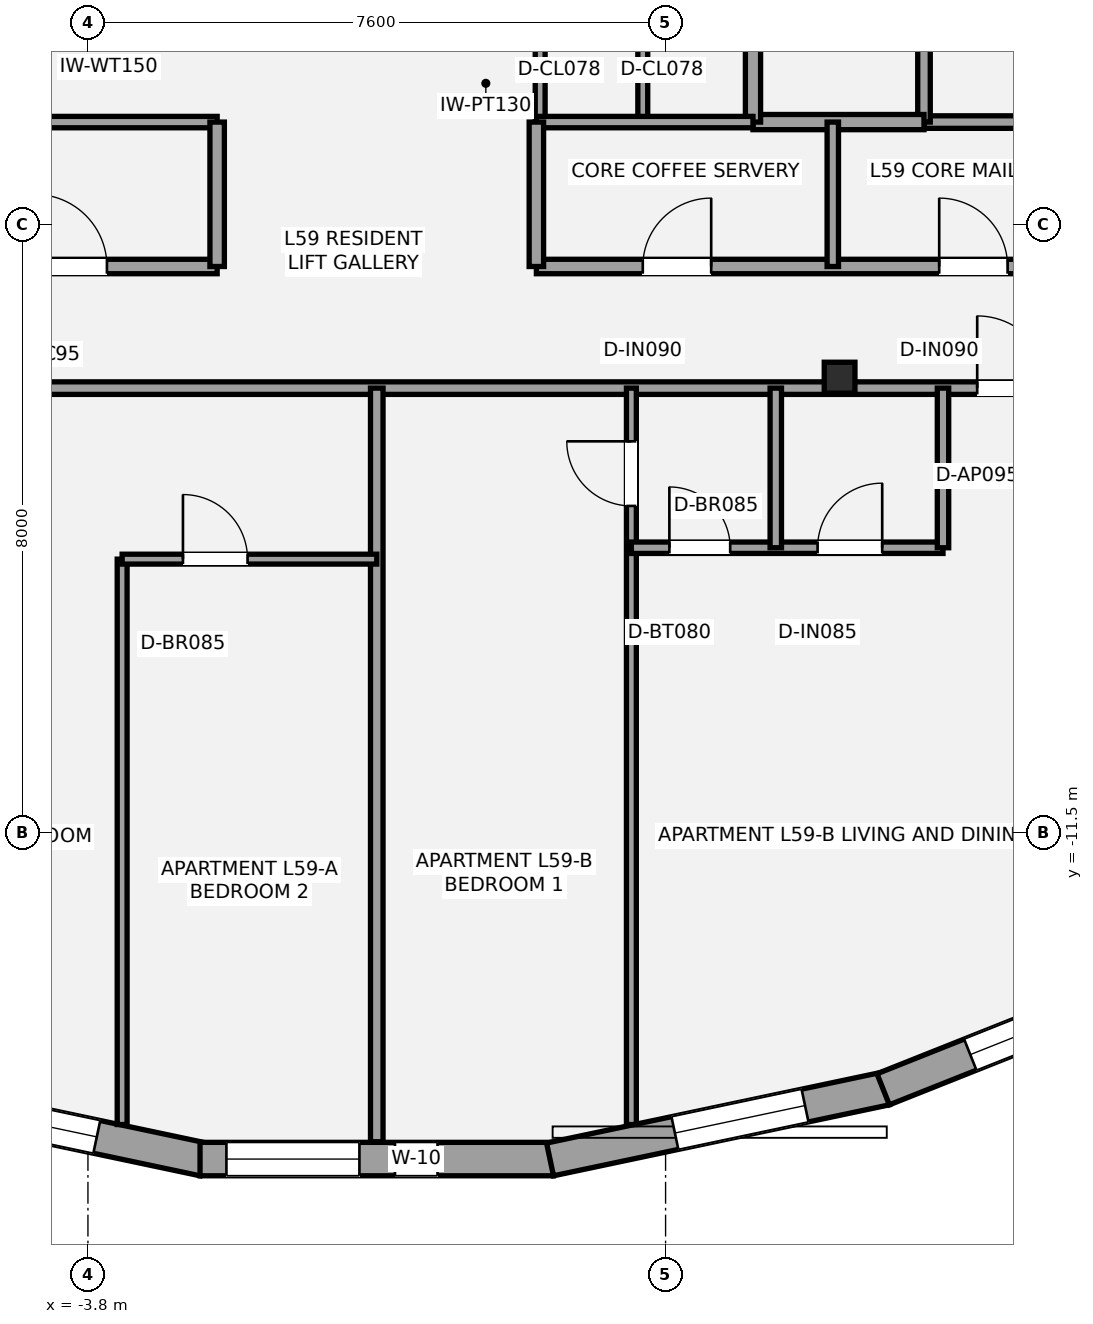
"""IFC4 building model, lengths in metres.
Left out: names, types, materials, properties, quantities, classifications, styles, units other than length and angle.
Written with IfcOpenShell. Run it as: python <this file> out.ifc"""

import sys

from ifc_helpers import new_model, si_unit, direction, frame, frame_2d, origin, origin_2d, place, context, subcontext, project, spatial, rectangle, i_section, extrude, element, fill, save


model = new_model("IFC4")
c1 = context("Model", 3, precision=1e-05, world=origin(), true_north=direction((0.0, 1.0)))
c2 = subcontext(c1, "Body", "Model", "MODEL_VIEW")
j1 = project(units=[si_unit("LENGTHUNIT", "METRE"), si_unit("PLANEANGLEUNIT", "RADIAN")], contexts=[c1])
p1 = place(None, origin())
s1 = spatial("IfcSite", under=j1, at=p1, CompositionType="ELEMENT")
p2 = place(p1, origin())
s2 = spatial("IfcBuilding", under=s1, at=p2, CompositionType="ELEMENT")
p3 = place(p2, frame((0.0, 0.0, 213.15)))
s3 = spatial("IfcBuildingStorey", under=s2, at=p3, CompositionType="ELEMENT", Elevation=213.15)
p4 = place(p3, frame((6.09, -5.513, 0.0), z_axis=(0.0, 0.0, 1.0), x_axis=(1.0, 0.0, 0.0)))
e1 = element("IfcColumn", 1, at=p4, inside=s3, PredefinedType="COLUMN", context=c2, shape_type="SweptSolid", body=[
    extrude(i_section(OverallWidth=0.404, OverallDepth=0.407, WebThickness=0.027, FlangeThickness=0.044, at=origin_2d()), origin(), (0.0, 0.0, 1.0), 3.15),
])
p5 = place(p3, frame((-2.28, -15.798, 0.0), z_axis=(0.0, 0.0, 1.0), x_axis=(-0.97840271225, 0.206707843737, 0.0)))
e2 = element("IfcWall", 2, at=p5, inside=s3, PredefinedType="STANDARD", context=c2, shape_type="SweptSolid", body=[
    extrude(rectangle(XDim=4.517, YDim=0.44, at=frame_2d((2.258, 0.0))), origin(), (0.0, 0.0, 1.0), 2.336),
])
p6 = place(p5, frame((1.435, 0.0, 0.58)))
e3 = element("IfcOpeningElement", 3, at=p6, cuts=e2, PredefinedType="OPENING", context=c2, shape_type="SweptSolid", body=[
    extrude(rectangle(XDim=1.4, YDim=1.55, at=frame_2d((0.7, 0.775))), frame((0.0, 0.23, 0.0), z_axis=(0.0, -1.0, 0.0), x_axis=(1.0, 0.0, 0.0)), (0.0, 0.0, 1.0), 0.46),
])
p7 = place(p3, frame((2.325, -15.793, 0.0), z_axis=(0.0, 0.0, 1.0), x_axis=(-1.0, 0.0, 0.0)))
e4 = element("IfcWall", 4, at=p7, inside=s3, PredefinedType="STANDARD", context=c2, shape_type="SweptSolid", body=[
    extrude(rectangle(XDim=4.65, YDim=0.44, at=frame_2d((2.325, 0.0))), origin(), (0.0, 0.0, 1.0), 2.336),
])
p8 = place(p7, frame((2.553, 0.0, 0.55)))
e5 = element("IfcOpeningElement", 5, at=p8, cuts=e4, PredefinedType="OPENING", context=c2, shape_type="SweptSolid", body=[
    extrude(rectangle(XDim=1.75, YDim=1.55, at=frame_2d((0.875, 0.775))), frame((0.0, 0.23, 0.0), z_axis=(0.0, -1.0, 0.0), x_axis=(1.0, 0.0, 0.0)), (0.0, 0.0, 1.0), 0.46),
])
p9 = place(p7, frame((1.526, 0.0, 1.05)))
e6 = element("IfcOpeningElement", 6, at=p9, cuts=e4, PredefinedType="OPENING", context=c2, shape_type="SweptSolid", body=[
    extrude(rectangle(XDim=0.56, YDim=1.15, at=frame_2d((0.28, 0.575))), frame((0.0, 0.23, 0.0), z_axis=(0.0, -1.0, 0.0), x_axis=(1.0, 0.0, 0.0)), (0.0, 0.0, 1.0), 0.46),
])
p10 = place(p3, frame((6.699, -14.864, 0.0), z_axis=(0.0, 0.0, 1.0), x_axis=(-0.97840271225, -0.206707843737, 0.0)))
e7 = element("IfcWall", 7, at=p10, inside=s3, PredefinedType="STANDARD", context=c2, shape_type="SweptSolid", body=[
    extrude(rectangle(XDim=4.517, YDim=0.44, at=frame_2d((2.258, 0.0))), origin(), (0.0, 0.0, 1.0), 2.336),
])
p11 = place(p10, frame((1.087, 0.0, 0.55)))
e8 = element("IfcOpeningElement", 8, at=p11, cuts=e7, PredefinedType="OPENING", context=c2, shape_type="SweptSolid", body=[
    extrude(rectangle(XDim=1.75, YDim=1.55, at=frame_2d((0.875, 0.775))), frame((0.0, 0.23, 0.0), z_axis=(0.0, -1.0, 0.0), x_axis=(1.0, 0.0, 0.0)), (0.0, 0.0, 1.0), 0.46),
])
p12 = place(p3, frame((10.576, -13.318, 0.0), z_axis=(0.0, 0.0, 1.0), x_axis=(-0.929170765931, -0.369650764558, 0.0)))
e9 = element("IfcWall", 9, at=p12, inside=s3, PredefinedType="STANDARD", context=c2, shape_type="SweptSolid", body=[
    extrude(rectangle(XDim=4.211, YDim=0.44, at=frame_2d((2.105, 0.0))), origin(), (0.0, 0.0, 1.0), 2.336),
])
p13 = place(p12, frame((1.578, 0.0, 0.55)))
e10 = element("IfcOpeningElement", 10, at=p13, cuts=e9, PredefinedType="OPENING", context=c2, shape_type="SweptSolid", body=[
    extrude(rectangle(XDim=1.4, YDim=1.55, at=frame_2d((0.7, 0.775))), frame((0.0, 0.23, 0.0), z_axis=(0.0, -1.0, 0.0), x_axis=(1.0, 0.0, 0.0)), (0.0, 0.0, 1.0), 0.46),
])
p14 = place(p3, frame((7.2, -2.15, 0.0), z_axis=(0.0, 0.0, 1.0), x_axis=(1.0, 0.0, 0.0)))
e11 = element("IfcWall", 11, at=p14, inside=s3, PredefinedType="PARTITIONING", context=c2, shape_type="SweptSolid", body=[
    extrude(rectangle(XDim=6.25, YDim=0.165, at=frame_2d((3.125, 0.0))), origin(), (0.0, 0.0, 1.0), 2.423),
])
p15 = place(p3, frame((7.2, -2.15, 0.0), z_axis=(0.0, 0.0, 1.0), x_axis=(0.0, 1.0, 0.0)))
e12 = element("IfcWall", 12, at=p15, inside=s3, PredefinedType="PARTITIONING", context=c2, shape_type="SweptSolid", body=[
    extrude(rectangle(XDim=3.5, YDim=0.165, at=frame_2d((1.75, 0.0))), origin(), (0.0, 0.0, 1.0), 2.423),
])
p16 = place(p3, frame((4.95, -2.15, 0.0), z_axis=(0.0, 0.0, 1.0), x_axis=(1.0, 0.0, 0.0)))
e13 = element("IfcWall", 13, at=p16, inside=s3, PredefinedType="SOLIDWALL", context=c2, shape_type="SweptSolid", body=[
    extrude(rectangle(XDim=2.25, YDim=0.2, at=frame_2d((1.125, 0.0))), origin(), (0.0, 0.0, 1.0), 2.97),
])
p17 = place(p3, frame((4.95, -2.15, 0.0), z_axis=(0.0, 0.0, 1.0), x_axis=(0.0, 1.0, 0.0)))
e14 = element("IfcWall", 14, at=p17, inside=s3, PredefinedType="SOLIDWALL", context=c2, shape_type="SweptSolid", body=[
    extrude(rectangle(XDim=3.5, YDim=0.2, at=frame_2d((1.75, 0.0))), origin(), (0.0, 0.0, 1.0), 2.423),
])
p18 = place(p17, frame((0.95, 0.0, 0.0)))
e15 = element("IfcOpeningElement", 15, at=p18, cuts=e14, PredefinedType="OPENING", context=c2, shape_type="SweptSolid", body=[
    extrude(rectangle(XDim=0.75, YDim=2.1, at=frame_2d((0.375, 1.05))), frame((0.0, 0.11, 0.0), z_axis=(0.0, -1.0, 0.0), x_axis=(1.0, 0.0, 0.0)), (0.0, 0.0, 1.0), 0.22),
])
for number, where, z_axis, x_axis in (
    (16, (2.15, -2.15, 0.0), (0.0, 0.0, 1.0), (0.0, 1.0, 0.0)),
    (17, (3.5, -2.15, 0.0), (0.0, 0.0, 1.0), (0.0, 1.0, 0.0)),
):
    element("IfcWall", number, at=place(p3, frame(where, z_axis=z_axis, x_axis=x_axis)), inside=s3, PredefinedType="PARTITIONING", context=c2, shape_type="SweptSolid", body=[
        extrude(rectangle(XDim=1.8, YDim=0.13, at=frame_2d((0.9, 0.0))), origin(), (0.0, 0.0, 1.0), 2.97),
    ])
p19 = place(p3, frame((-13.45, -4.05, 0.0), z_axis=(0.0, 0.0, 1.0), x_axis=(1.0, 0.0, 0.0)))
e18 = element("IfcWall", 18, at=p19, inside=s3, PredefinedType="PLUMBINGWALL", context=c2, shape_type="SweptSolid", body=[
    extrude(rectangle(XDim=11.35, YDim=0.19, at=frame_2d((5.675, 0.0))), origin(), (0.0, 0.0, 1.0), 2.357),
])
p20 = place(p19, frame((1.25, 0.0, 0.0)))
e19 = element("IfcOpeningElement", 19, at=p20, cuts=e18, PredefinedType="OPENING", context=c2, shape_type="SweptSolid", body=[
    extrude(rectangle(XDim=0.85, YDim=2.1, at=frame_2d((0.425, 1.05))), frame((0.0, 0.105, 0.0), z_axis=(0.0, -1.0, 0.0), x_axis=(1.0, 0.0, 0.0)), (0.0, 0.0, 1.0), 0.21),
])
p21 = place(p19, frame((5.1, 0.0, 0.0)))
e20 = element("IfcOpeningElement", 20, at=p21, cuts=e18, PredefinedType="OPENING", context=c2, shape_type="SweptSolid", body=[
    extrude(rectangle(XDim=0.85, YDim=2.1, at=frame_2d((0.425, 1.05))), frame((0.0, 0.105, 0.0), z_axis=(0.0, -1.0, 0.0), x_axis=(1.0, 0.0, 0.0)), (0.0, 0.0, 1.0), 0.21),
])
p22 = place(p19, frame((8.95, 0.0, 0.0)))
e21 = element("IfcOpeningElement", 21, at=p22, cuts=e18, PredefinedType="OPENING", context=c2, shape_type="SweptSolid", body=[
    extrude(rectangle(XDim=0.95, YDim=2.15, at=frame_2d((0.475, 1.075))), frame((0.0, 0.105, 0.0), z_axis=(0.0, -1.0, 0.0), x_axis=(1.0, 0.0, 0.0)), (0.0, 0.0, 1.0), 0.21),
])
p23 = place(p3, frame((-4.95, -2.15, 0.0), z_axis=(0.0, 0.0, 1.0), x_axis=(1.0, 0.0, 0.0)))
e22 = element("IfcWall", 22, at=p23, inside=s3, PredefinedType="PLUMBINGWALL", context=c2, shape_type="SweptSolid", body=[
    extrude(rectangle(XDim=2.85, YDim=0.15, at=frame_2d((1.425, 0.0))), origin(), (0.0, 0.0, 1.0), 2.97),
])
p24 = place(p3, frame((-2.1, -4.05, 0.0), z_axis=(0.0, 0.0, 1.0), x_axis=(0.0, 1.0, 0.0)))
e23 = element("IfcWall", 23, at=p24, inside=s3, PredefinedType="PLUMBINGWALL", context=c2, shape_type="SweptSolid", body=[
    extrude(rectangle(XDim=1.9, YDim=0.19, at=frame_2d((0.95, 0.0))), origin(), (0.0, 0.0, 1.0), 2.423),
])
p25 = place(p3, frame((2.1, -4.05, 0.0), z_axis=(0.0, 0.0, 1.0), x_axis=(1.0, 0.0, 0.0)))
e24 = element("IfcWall", 24, at=p25, inside=s3, PredefinedType="PLUMBINGWALL", context=c2, shape_type="SweptSolid", body=[
    extrude(rectangle(XDim=11.35, YDim=0.19, at=frame_2d((5.675, 0.0))), origin(), (0.0, 0.0, 1.0), 2.357),
])
p26 = place(p25, frame((1.4, 0.0, 0.0)))
e25 = element("IfcOpeningElement", 25, at=p26, cuts=e24, PredefinedType="OPENING", context=c2, shape_type="SweptSolid", body=[
    extrude(rectangle(XDim=0.9, YDim=2.1, at=frame_2d((0.45, 1.05))), frame((0.0, 0.105, 0.0), z_axis=(0.0, -1.0, 0.0), x_axis=(1.0, 0.0, 0.0)), (0.0, 0.0, 1.0), 0.21),
])
p27 = place(p25, frame((5.3, 0.0, 0.0)))
e26 = element("IfcOpeningElement", 26, at=p27, cuts=e24, PredefinedType="OPENING", context=c2, shape_type="SweptSolid", body=[
    extrude(rectangle(XDim=0.9, YDim=2.1, at=frame_2d((0.45, 1.05))), frame((0.0, 0.105, 0.0), z_axis=(0.0, -1.0, 0.0), x_axis=(1.0, 0.0, 0.0)), (0.0, 0.0, 1.0), 0.21),
])
p28 = place(p25, frame((9.1, 0.0, 0.0)))
e27 = element("IfcOpeningElement", 27, at=p28, cuts=e24, PredefinedType="OPENING", context=c2, shape_type="SweptSolid", body=[
    extrude(rectangle(XDim=0.9, YDim=2.1, at=frame_2d((0.45, 1.05))), frame((0.0, 0.105, 0.0), z_axis=(0.0, -1.0, 0.0), x_axis=(1.0, 0.0, 0.0)), (0.0, 0.0, 1.0), 0.21),
])
p29 = place(p3, frame((2.1, -2.15, 0.0), z_axis=(0.0, 0.0, 1.0), x_axis=(1.0, 0.0, 0.0)))
e28 = element("IfcWall", 28, at=p29, inside=s3, PredefinedType="PLUMBINGWALL", context=c2, shape_type="SweptSolid", body=[
    extrude(rectangle(XDim=2.85, YDim=0.15, at=frame_2d((1.425, 0.0))), origin(), (0.0, 0.0, 1.0), 2.97),
])
p30 = place(p3, frame((2.1, -4.05, 0.0), z_axis=(0.0, 0.0, 1.0), x_axis=(0.0, 1.0, 0.0)))
e29 = element("IfcWall", 29, at=p30, inside=s3, PredefinedType="PLUMBINGWALL", context=c2, shape_type="SweptSolid", body=[
    extrude(rectangle(XDim=1.9, YDim=0.19, at=frame_2d((0.95, 0.0))), origin(), (0.0, 0.0, 1.0), 2.97),
])
p31 = place(p3, frame((6.0, -4.05, 0.0), z_axis=(0.0, 0.0, 1.0), x_axis=(0.0, 1.0, 0.0)))
e30 = element("IfcWall", 30, at=p31, inside=s3, PredefinedType="PLUMBINGWALL", context=c2, shape_type="SweptSolid", body=[
    extrude(rectangle(XDim=1.9, YDim=0.15, at=frame_2d((0.95, 0.0))), origin(), (0.0, 0.0, 1.0), 2.431),
])
p32 = place(p3, frame((-20.71, -5.65, 0.0), z_axis=(0.0, 0.0, 1.0), x_axis=(1.0, 0.0, 0.0)))
e31 = element("IfcWall", 31, at=p32, inside=s3, PredefinedType="PARTITIONING", context=c2, shape_type="SweptSolid", body=[
    extrude(rectangle(XDim=41.42, YDim=0.165, at=frame_2d((20.71, 0.0))), origin(), (0.0, 0.0, 1.0), 2.357),
])
p33 = place(p32, frame((1.587, 0.0, 0.0)))
e32 = element("IfcOpeningElement", 32, at=p33, cuts=e31, PredefinedType="OPENING", context=c2, shape_type="SweptSolid", body=[
    extrude(rectangle(XDim=1.0, YDim=2.15, at=frame_2d((0.5, 1.075))), frame((0.0, 0.093, 0.0), z_axis=(0.0, -1.0, 0.0), x_axis=(1.0, 0.0, 0.0)), (0.0, 0.0, 1.0), 0.185),
])
p34 = place(p32, frame((38.833, 0.0, 0.0)))
e33 = element("IfcOpeningElement", 33, at=p34, cuts=e31, PredefinedType="OPENING", context=c2, shape_type="SweptSolid", body=[
    extrude(rectangle(XDim=1.0, YDim=2.15, at=frame_2d((0.5, 1.075))), frame((0.0, 0.093, 0.0), z_axis=(0.0, -1.0, 0.0), x_axis=(1.0, 0.0, 0.0)), (0.0, 0.0, 1.0), 0.185),
])
p35 = place(p32, frame((15.02, 0.0, 0.0)))
e34 = element("IfcOpeningElement", 34, at=p35, cuts=e31, PredefinedType="OPENING", context=c2, shape_type="SweptSolid", body=[
    extrude(rectangle(XDim=0.95, YDim=2.15, at=frame_2d((0.475, 1.075))), frame((0.0, 0.093, 0.0), z_axis=(0.0, -1.0, 0.0), x_axis=(1.0, 0.0, 0.0)), (0.0, 0.0, 1.0), 0.185),
])
p36 = place(p32, frame((28.61, 0.0, 0.0)))
e35 = element("IfcOpeningElement", 35, at=p36, cuts=e31, PredefinedType="OPENING", context=c2, shape_type="SweptSolid", body=[
    extrude(rectangle(XDim=0.95, YDim=2.15, at=frame_2d((0.475, 1.075))), frame((0.0, 0.093, 0.0), z_axis=(0.0, -1.0, 0.0), x_axis=(1.0, 0.0, 0.0)), (0.0, 0.0, 1.0), 0.185),
])
p37 = place(p3, frame((0.0, -15.565, 0.0), z_axis=(0.0, 0.0, 1.0), x_axis=(0.0, 1.0, 0.0)))
e36 = element("IfcWall", 36, at=p37, inside=s3, PredefinedType="PARTITIONING", context=c2, shape_type="SweptSolid", body=[
    extrude(rectangle(XDim=9.915, YDim=0.165, at=frame_2d((4.958, 0.0))), origin(), (0.0, 0.0, 1.0), 2.423),
])
p38 = place(p3, frame((-3.35, -15.338, 0.0), z_axis=(0.0, 0.0, 1.0), x_axis=(0.0, 1.0, 0.0)))
e37 = element("IfcWall", 37, at=p38, inside=s3, PredefinedType="PARTITIONING", context=c2, shape_type="SweptSolid", body=[
    extrude(rectangle(XDim=7.438, YDim=0.13, at=frame_2d((3.719, 0.0))), origin(), (0.0, 0.0, 1.0), 2.423),
])
p39 = place(p3, frame((-3.35, -7.9, 0.0), z_axis=(0.0, 0.0, 1.0), x_axis=(1.0, 0.0, 0.0)))
e38 = element("IfcWall", 38, at=p39, inside=s3, PredefinedType="PARTITIONING", context=c2, shape_type="SweptSolid", body=[
    extrude(rectangle(XDim=3.35, YDim=0.13, at=frame_2d((1.675, 0.0))), origin(), (0.0, 0.0, 1.0), 2.423),
])
p40 = place(p39, frame((0.8, 0.0, 0.0)))
e39 = element("IfcOpeningElement", 39, at=p40, cuts=e38, PredefinedType="OPENING", context=c2, shape_type="SweptSolid", body=[
    extrude(rectangle(XDim=0.85, YDim=2.1, at=frame_2d((0.425, 1.05))), frame((0.0, 0.075, 0.0), z_axis=(0.0, -1.0, 0.0), x_axis=(1.0, 0.0, 0.0)), (0.0, 0.0, 1.0), 0.15),
])
p41 = place(p3, frame((3.35, -15.338, 0.0), z_axis=(0.0, 0.0, 1.0), x_axis=(0.0, 1.0, 0.0)))
e40 = element("IfcWall", 40, at=p41, inside=s3, PredefinedType="PARTITIONING", context=c2, shape_type="SweptSolid", body=[
    extrude(rectangle(XDim=9.688, YDim=0.13, at=frame_2d((4.844, 0.0))), origin(), (0.0, 0.0, 1.0), 2.423),
])
p42 = place(p41, frame((8.138, 0.0, 0.0)))
e41 = element("IfcOpeningElement", 41, at=p42, cuts=e40, PredefinedType="OPENING", context=c2, shape_type="SweptSolid", body=[
    extrude(rectangle(XDim=0.85, YDim=2.1, at=frame_2d((0.425, 1.05))), frame((0.0, 0.075, 0.0), z_axis=(0.0, -1.0, 0.0), x_axis=(1.0, 0.0, 0.0)), (0.0, 0.0, 1.0), 0.15),
])
p43 = place(p3, frame((3.35, -7.75, 0.0), z_axis=(0.0, 0.0, 1.0), x_axis=(1.0, 0.0, 0.0)))
e42 = element("IfcWall", 42, at=p43, inside=s3, PredefinedType="PLUMBINGWALL", context=c2, shape_type="SweptSolid", body=[
    extrude(rectangle(XDim=4.1, YDim=0.15, at=frame_2d((2.05, 0.0))), origin(), (0.0, 0.0, 1.0), 2.97),
])
p44 = place(p43, frame((0.5, 0.0, 0.0)))
e43 = element("IfcOpeningElement", 43, at=p44, cuts=e42, PredefinedType="OPENING", context=c2, shape_type="SweptSolid", body=[
    extrude(rectangle(XDim=0.8, YDim=2.1, at=frame_2d((0.4, 1.05))), frame((0.0, 0.085, 0.0), z_axis=(0.0, -1.0, 0.0), x_axis=(1.0, 0.0, 0.0)), (0.0, 0.0, 1.0), 0.17),
])
p45 = place(p43, frame((2.45, 0.0, 0.0)))
e44 = element("IfcOpeningElement", 44, at=p45, cuts=e42, PredefinedType="OPENING", context=c2, shape_type="SweptSolid", body=[
    extrude(rectangle(XDim=0.85, YDim=2.1, at=frame_2d((0.425, 1.05))), frame((0.0, 0.085, 0.0), z_axis=(0.0, -1.0, 0.0), x_axis=(1.0, 0.0, 0.0)), (0.0, 0.0, 1.0), 0.17),
])
for number, where, z_axis, x_axis in (
    (45, (5.25, -7.75, 0.0), (0.0, 0.0, 1.0), (0.0, 1.0, 0.0)),
    (46, (7.45, -7.75, 0.0), (0.0, 0.0, 1.0), (0.0, 1.0, 0.0)),
):
    element("IfcWall", number, at=place(p3, frame(where, z_axis=z_axis, x_axis=x_axis)), inside=s3, PredefinedType="PLUMBINGWALL", context=c2, shape_type="SweptSolid", body=[
        extrude(rectangle(XDim=2.1, YDim=0.15, at=frame_2d((1.05, 0.0))), origin(), (0.0, 0.0, 1.0), 2.97),
    ])
p46 = place(p6, origin())
e47 = element("IfcWindow", 47, at=p46, inside=s3, PartitioningType="SINGLE_PANEL", PredefinedType="WINDOW", context=c2, shape_type="SweptSolid", body=[
    extrude(rectangle(XDim=1.4, YDim=1.55, at=frame_2d((0.7, 0.775))), frame((0.0, -0.01, 0.0), z_axis=(0.0, -1.0, 0.0), x_axis=(1.0, 0.0, 0.0)), (0.0, 0.0, 1.0), 0.06),
])
fill(e3, e47)
p47 = place(p8, origin())
e48 = element("IfcWindow", 48, at=p47, inside=s3, PartitioningType="SINGLE_PANEL", PredefinedType="WINDOW", context=c2, shape_type="SweptSolid", body=[
    extrude(rectangle(XDim=1.75, YDim=1.55, at=frame_2d((0.875, 0.775))), frame((0.0, -0.01, 0.0), z_axis=(0.0, -1.0, 0.0), x_axis=(1.0, 0.0, 0.0)), (0.0, 0.0, 1.0), 0.06),
])
fill(e5, e48)
p48 = place(p11, origin())
e49 = element("IfcWindow", 49, at=p48, inside=s3, PartitioningType="SINGLE_PANEL", PredefinedType="WINDOW", context=c2, shape_type="SweptSolid", body=[
    extrude(rectangle(XDim=1.75, YDim=1.55, at=frame_2d((0.875, 0.775))), frame((0.0, -0.01, 0.0), z_axis=(0.0, -1.0, 0.0), x_axis=(1.0, 0.0, 0.0)), (0.0, 0.0, 1.0), 0.06),
])
fill(e8, e49)
p49 = place(p13, origin())
e50 = element("IfcWindow", 50, at=p49, inside=s3, PartitioningType="SINGLE_PANEL", PredefinedType="WINDOW", context=c2, shape_type="SweptSolid", body=[
    extrude(rectangle(XDim=1.4, YDim=1.55, at=frame_2d((0.7, 0.775))), frame((0.0, -0.01, 0.0), z_axis=(0.0, -1.0, 0.0), x_axis=(1.0, 0.0, 0.0)), (0.0, 0.0, 1.0), 0.06),
])
fill(e10, e50)
p50 = place(p9, origin())
e51 = element("IfcWindow", 51, at=p50, inside=s3, PartitioningType="SINGLE_PANEL", PredefinedType="WINDOW", context=c2, shape_type="SweptSolid", body=[
    extrude(rectangle(XDim=0.56, YDim=1.15, at=frame_2d((0.28, 0.575))), frame((0.0, -0.01, 0.0), z_axis=(0.0, -1.0, 0.0), x_axis=(1.0, 0.0, 0.0)), (0.0, 0.0, 1.0), 0.06),
])
fill(e6, e51)
p51 = place(p22, origin())
e52 = element("IfcDoor", 52, at=p51, inside=s3, OperationType="SINGLE_SWING_LEFT", PredefinedType="DOOR", context=c2, shape_type="SweptSolid", body=[
    extrude(rectangle(XDim=0.95, YDim=2.15, at=frame_2d((0.475, 1.075))), frame((0.0, 0.025, 0.0), z_axis=(0.0, -1.0, 0.0), x_axis=(1.0, 0.0, 0.0)), (0.0, 0.0, 1.0), 0.05),
])
fill(e21, e52)
p52 = place(p26, origin())
e53 = element("IfcDoor", 53, at=p52, inside=s3, OperationType="SINGLE_SWING_RIGHT", PredefinedType="DOOR", context=c2, shape_type="SweptSolid", body=[
    extrude(rectangle(XDim=0.9, YDim=2.1, at=frame_2d((0.45, 1.05))), frame((0.0, 0.025, 0.0), z_axis=(0.0, -1.0, 0.0), x_axis=(1.0, 0.0, 0.0)), (0.0, 0.0, 1.0), 0.05),
])
fill(e25, e53)
p53 = place(p27, origin())
e54 = element("IfcDoor", 54, at=p53, inside=s3, OperationType="SINGLE_SWING_LEFT", PredefinedType="DOOR", context=c2, shape_type="SweptSolid", body=[
    extrude(rectangle(XDim=0.9, YDim=2.1, at=frame_2d((0.45, 1.05))), frame((0.0, 0.025, 0.0), z_axis=(0.0, -1.0, 0.0), x_axis=(1.0, 0.0, 0.0)), (0.0, 0.0, 1.0), 0.05),
])
fill(e26, e54)
p54 = place(p40, origin())
e55 = element("IfcDoor", 55, at=p54, inside=s3, OperationType="SINGLE_SWING_LEFT", PredefinedType="DOOR", context=c2, shape_type="SweptSolid", body=[
    extrude(rectangle(XDim=0.85, YDim=2.1, at=frame_2d((0.425, 1.05))), frame((0.0, 0.025, 0.0), z_axis=(0.0, -1.0, 0.0), x_axis=(1.0, 0.0, 0.0)), (0.0, 0.0, 1.0), 0.05),
])
fill(e39, e55)
p55 = place(p42, origin())
e56 = element("IfcDoor", 56, at=p55, inside=s3, OperationType="SINGLE_SWING_RIGHT", PredefinedType="DOOR", context=c2, shape_type="SweptSolid", body=[
    extrude(rectangle(XDim=0.85, YDim=2.1, at=frame_2d((0.425, 1.05))), frame((0.0, 0.025, 0.0), z_axis=(0.0, -1.0, 0.0), x_axis=(1.0, 0.0, 0.0)), (0.0, 0.0, 1.0), 0.05),
])
fill(e41, e56)
p56 = place(p44, origin())
e57 = element("IfcDoor", 57, at=p56, inside=s3, OperationType="SINGLE_SWING_LEFT", PredefinedType="DOOR", context=c2, shape_type="SweptSolid", body=[
    extrude(rectangle(XDim=0.8, YDim=2.1, at=frame_2d((0.4, 1.05))), frame((0.0, 0.025, 0.0), z_axis=(0.0, -1.0, 0.0), x_axis=(1.0, 0.0, 0.0)), (0.0, 0.0, 1.0), 0.05),
])
fill(e43, e57)
p57 = place(p45, origin())
e58 = element("IfcDoor", 58, at=p57, inside=s3, OperationType="SINGLE_SWING_RIGHT", PredefinedType="DOOR", context=c2, shape_type="SweptSolid", body=[
    extrude(rectangle(XDim=0.85, YDim=2.1, at=frame_2d((0.425, 1.05))), frame((0.0, 0.025, 0.0), z_axis=(0.0, -1.0, 0.0), x_axis=(1.0, 0.0, 0.0)), (0.0, 0.0, 1.0), 0.05),
])
fill(e44, e58)
p58 = place(p36, origin())
e59 = element("IfcDoor", 59, at=p58, inside=s3, OperationType="SINGLE_SWING_LEFT", PredefinedType="DOOR", context=c2, shape_type="SweptSolid", body=[
    extrude(rectangle(XDim=0.95, YDim=2.15, at=frame_2d((0.475, 1.075))), frame((0.0, 0.025, 0.0), z_axis=(0.0, -1.0, 0.0), x_axis=(1.0, 0.0, 0.0)), (0.0, 0.0, 1.0), 0.05),
])
fill(e35, e59)
save(model, sys.argv[1])
